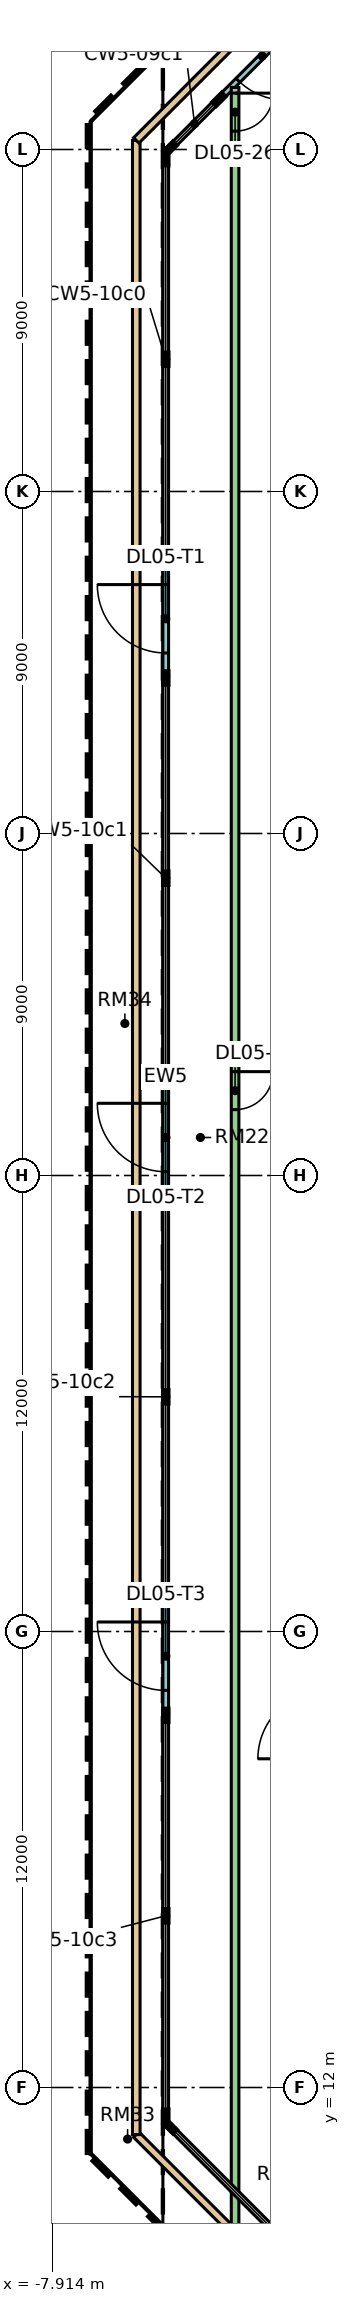
"""IFC4 building model, lengths in metres.
Left out: names, types, materials, properties, quantities, classifications, styles, units other than length and angle.
Written with IfcOpenShell. Run it as: python <this file> out.ifc"""

import sys

from ifc_helpers import new_model, si_unit, direction, frame, frame_2d, origin, place, context, subcontext, project, spatial, rectangle, extrude, element, fill, save


model = new_model("IFC4")
c1 = context("Model", 3, precision=1e-05, world=origin(), true_north=direction((0.0, 1.0)))
c2 = subcontext(c1, "Body", "Model", "MODEL_VIEW")
j1 = project(units=[si_unit("LENGTHUNIT", "METRE"), si_unit("PLANEANGLEUNIT", "RADIAN")], contexts=[c1])
p1 = place(None, origin())
s1 = spatial("IfcSite", under=j1, at=p1, CompositionType="ELEMENT")
p2 = place(p1, origin())
s2 = spatial("IfcBuilding", under=s1, at=p2, CompositionType="ELEMENT")
p3 = place(p2, frame((0.0, 0.0, 26.4)))
s3 = spatial("IfcBuildingStorey", under=s2, at=p3, CompositionType="ELEMENT", Elevation=26.4)
p4 = place(p3, frame((-1.361, 66.482, 0.0), z_axis=(0.0, 0.0, 1.0), x_axis=(-0.707106781187, -0.707106781187, 0.0)))
e1 = element("IfcWall", 1, at=p4, inside=s3, PredefinedType="SOLIDWALL", context=c2, shape_type="SweptSolid", body=[
    extrude(rectangle(XDim=3.0, YDim=0.15, at=frame_2d((1.5, 0.0))), origin(), (0.0, 0.0, 1.0), 8.45),
])
p5 = place(p4, frame((0.55, 0.0, 0.0)))
e2 = element("IfcOpeningElement", 2, at=p5, cuts=e1, PredefinedType="OPENING", context=c2, shape_type="SweptSolid", body=[
    extrude(rectangle(XDim=1.8, YDim=2.4, at=frame_2d((0.9, 1.2))), frame((0.0, 0.085, 0.0), z_axis=(0.0, -1.0, 0.0), x_axis=(1.0, 0.0, 0.0)), (0.0, 0.0, 1.0), 0.17),
])
p6 = place(p3, frame((-4.925, 52.15, 0.0), z_axis=(0.0, 0.0, 1.0), x_axis=(0.0, -1.0, 0.0)))
e3 = element("IfcWall", 3, at=p6, inside=s3, PredefinedType="SOLIDWALL", context=c2, shape_type="SweptSolid", body=[
    extrude(rectangle(XDim=3.0, YDim=0.15, at=frame_2d((1.5, 0.0))), origin(), (0.0, 0.0, 1.0), 8.45),
])
p7 = place(p6, frame((0.6, 0.0, 0.0)))
e4 = element("IfcOpeningElement", 4, at=p7, cuts=e3, PredefinedType="OPENING", context=c2, shape_type="SweptSolid", body=[
    extrude(rectangle(XDim=1.8, YDim=2.4, at=frame_2d((0.9, 1.2))), frame((0.0, 0.085, 0.0), z_axis=(0.0, -1.0, 0.0), x_axis=(1.0, 0.0, 0.0)), (0.0, 0.0, 1.0), 0.17),
])
p8 = place(p3, frame((-4.925, 38.5, 0.0), z_axis=(0.0, 0.0, 1.0), x_axis=(0.0, -1.0, 0.0)))
e5 = element("IfcWall", 5, at=p8, inside=s3, PredefinedType="SOLIDWALL", context=c2, shape_type="SweptSolid", body=[
    extrude(rectangle(XDim=3.0, YDim=0.15, at=frame_2d((1.5, 0.0))), origin(), (0.0, 0.0, 1.0), 8.45),
])
p9 = place(p8, frame((0.6, 0.0, 0.0)))
e6 = element("IfcOpeningElement", 6, at=p9, cuts=e5, PredefinedType="OPENING", context=c2, shape_type="SweptSolid", body=[
    extrude(rectangle(XDim=1.8, YDim=2.4, at=frame_2d((0.9, 1.2))), frame((0.0, 0.085, 0.0), z_axis=(0.0, -1.0, 0.0), x_axis=(1.0, 0.0, 0.0)), (0.0, 0.0, 1.0), 0.17),
])
p10 = place(p3, frame((-4.925, 24.85, 0.0), z_axis=(0.0, 0.0, 1.0), x_axis=(0.0, -1.0, 0.0)))
e7 = element("IfcWall", 7, at=p10, inside=s3, PredefinedType="SOLIDWALL", context=c2, shape_type="SweptSolid", body=[
    extrude(rectangle(XDim=3.0, YDim=0.15, at=frame_2d((1.5, 0.0))), origin(), (0.0, 0.0, 1.0), 8.45),
])
p11 = place(p10, frame((0.6, 0.0, 0.0)))
e8 = element("IfcOpeningElement", 8, at=p11, cuts=e7, PredefinedType="OPENING", context=c2, shape_type="SweptSolid", body=[
    extrude(rectangle(XDim=1.8, YDim=2.4, at=frame_2d((0.9, 1.2))), frame((0.0, 0.085, 0.0), z_axis=(0.0, -1.0, 0.0), x_axis=(1.0, 0.0, 0.0)), (0.0, 0.0, 1.0), 0.17),
])
p12 = place(p3, frame((10.76, -5.7, 0.0), z_axis=(0.0, 0.0, 1.0), x_axis=(-0.707106781187, 0.707106781187, 0.0)))
e9 = element("IfcWall", 9, at=p12, inside=s3, PredefinedType="PARAPET", context=c2, shape_type="SweptSolid", body=[
    extrude(rectangle(XDim=23.278, YDim=0.2, at=frame_2d((11.639, 0.0))), origin(), (0.0, 0.0, 1.0), 0.5),
])
p13 = place(p3, frame((-5.7, 10.76, 0.0), z_axis=(0.0, 0.0, 1.0), x_axis=(0.0, 1.0, 0.0)))
e10 = element("IfcWall", 10, at=p13, inside=s3, PredefinedType="PARAPET", context=c2, shape_type="SweptSolid", body=[
    extrude(rectangle(XDim=52.479, YDim=0.2, at=frame_2d((26.24, 0.0))), origin(), (0.0, 0.0, 1.0), 0.5),
])
p14 = place(p3, frame((-5.7, 63.24, 0.0), z_axis=(0.0, 0.0, 1.0), x_axis=(0.707106781187, 0.707106781187, 0.0)))
e11 = element("IfcWall", 11, at=p14, inside=s3, PredefinedType="PARAPET", context=c2, shape_type="SweptSolid", body=[
    extrude(rectangle(XDim=7.722, YDim=0.2, at=frame_2d((3.861, 0.0))), origin(), (0.0, 0.0, 1.0), 0.5),
])
p15 = place(p3, frame((-3.1, 8.302, 0.0), z_axis=(0.0, 0.0, 1.0), x_axis=(0.0, 1.0, 0.0)))
e12 = element("IfcWall", 12, at=p15, inside=s3, PredefinedType="PARTITIONING", context=c2, shape_type="SweptSolid", body=[
    extrude(rectangle(XDim=56.331, YDim=0.2, at=frame_2d((28.166, 0.0))), origin(), (0.0, 0.0, 1.0), 8.45),
])
p16 = place(p15, frame((29.431, 0.0, 0.0)))
e13 = element("IfcOpeningElement", 13, at=p16, cuts=e12, PredefinedType="OPENING", context=c2, shape_type="SweptSolid", body=[
    extrude(rectangle(XDim=1.0, YDim=2.1, at=frame_2d((0.5, 1.05))), frame((0.0, 0.11, 0.0), z_axis=(0.0, -1.0, 0.0), x_axis=(1.0, 0.0, 0.0)), (0.0, 0.0, 1.0), 0.22),
])
p17 = place(p15, frame((55.181, 0.0, 0.0)))
e14 = element("IfcOpeningElement", 14, at=p17, cuts=e12, PredefinedType="OPENING", context=c2, shape_type="SweptSolid", body=[
    extrude(rectangle(XDim=1.0, YDim=2.1, at=frame_2d((0.5, 1.05))), frame((0.0, 0.11, 0.0), z_axis=(0.0, -1.0, 0.0), x_axis=(1.0, 0.0, 0.0)), (0.0, 0.0, 1.0), 0.22),
])
p18 = place(p5, origin())
e15 = element("IfcDoor", 15, at=p18, inside=s3, OperationType="DOUBLE_DOOR_SINGLE_SWING", PredefinedType="DOOR", context=c2, shape_type="SweptSolid", body=[
    extrude(rectangle(XDim=1.8, YDim=2.4, at=frame_2d((0.9, 1.2))), frame((0.0, 0.025, 0.0), z_axis=(0.0, -1.0, 0.0), x_axis=(1.0, 0.0, 0.0)), (0.0, 0.0, 1.0), 0.05),
])
fill(e2, e15)
p19 = place(p7, frame((1.8, 0.0, 0.0), z_axis=(0.0, 0.0, 1.0), x_axis=(-1.0, 0.0, 0.0)))
e16 = element("IfcDoor", 16, at=p19, inside=s3, OperationType="DOUBLE_DOOR_SINGLE_SWING", PredefinedType="DOOR", context=c2, shape_type="SweptSolid", body=[
    extrude(rectangle(XDim=1.8, YDim=2.4, at=frame_2d((0.9, 1.2))), frame((0.0, 0.025, 0.0), z_axis=(0.0, -1.0, 0.0), x_axis=(1.0, 0.0, 0.0)), (0.0, 0.0, 1.0), 0.05),
])
fill(e4, e16)
p20 = place(p9, frame((1.8, 0.0, 0.0), z_axis=(0.0, 0.0, 1.0), x_axis=(-1.0, 0.0, 0.0)))
e17 = element("IfcDoor", 17, at=p20, inside=s3, OperationType="DOUBLE_DOOR_SINGLE_SWING", PredefinedType="DOOR", context=c2, shape_type="SweptSolid", body=[
    extrude(rectangle(XDim=1.8, YDim=2.4, at=frame_2d((0.9, 1.2))), frame((0.0, 0.025, 0.0), z_axis=(0.0, -1.0, 0.0), x_axis=(1.0, 0.0, 0.0)), (0.0, 0.0, 1.0), 0.05),
])
fill(e6, e17)
p21 = place(p11, frame((1.8, 0.0, 0.0), z_axis=(0.0, 0.0, 1.0), x_axis=(-1.0, 0.0, 0.0)))
e18 = element("IfcDoor", 18, at=p21, inside=s3, OperationType="DOUBLE_DOOR_SINGLE_SWING", PredefinedType="DOOR", context=c2, shape_type="SweptSolid", body=[
    extrude(rectangle(XDim=1.8, YDim=2.4, at=frame_2d((0.9, 1.2))), frame((0.0, 0.025, 0.0), z_axis=(0.0, -1.0, 0.0), x_axis=(1.0, 0.0, 0.0)), (0.0, 0.0, 1.0), 0.05),
])
fill(e8, e18)
p22 = place(p16, origin())
e19 = element("IfcDoor", 19, at=p22, inside=s3, OperationType="SINGLE_SWING_RIGHT", PredefinedType="DOOR", context=c2, shape_type="SweptSolid", body=[
    extrude(rectangle(XDim=1.0, YDim=2.1, at=frame_2d((0.5, 1.05))), frame((0.0, 0.025, 0.0), z_axis=(0.0, -1.0, 0.0), x_axis=(1.0, 0.0, 0.0)), (0.0, 0.0, 1.0), 0.05),
])
fill(e13, e19)
p23 = place(p17, origin())
e20 = element("IfcDoor", 20, at=p23, inside=s3, OperationType="SINGLE_SWING_RIGHT", PredefinedType="DOOR", context=c2, shape_type="SweptSolid", body=[
    extrude(rectangle(XDim=1.0, YDim=2.1, at=frame_2d((0.5, 1.05))), frame((0.0, 0.025, 0.0), z_axis=(0.0, -1.0, 0.0), x_axis=(1.0, 0.0, 0.0)), (0.0, 0.0, 1.0), 0.05),
])
fill(e14, e20)
save(model, sys.argv[1])
